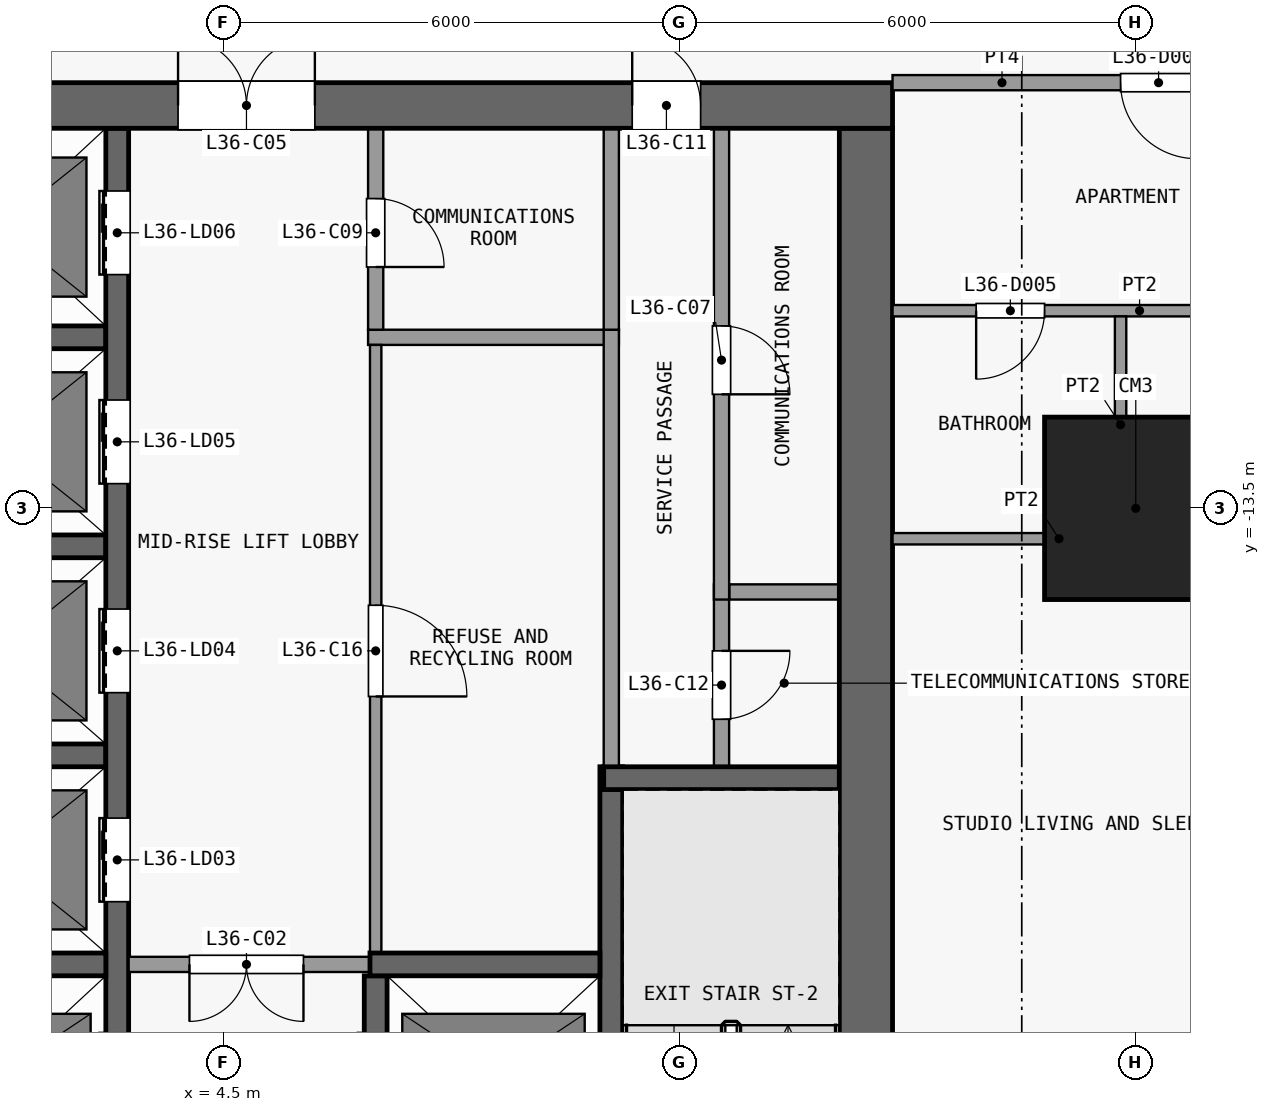
"""IFC4 building model, lengths in metres.
Left out: names, types, materials, properties, quantities, classifications, styles, units other than length and angle.
Written with IfcOpenShell. Run it as: python <this file> out.ifc"""

import sys

from ifc_helpers import new_model, si_unit, direction, frame, frame_2d, origin, origin_2d, place, context, subcontext, project, spatial, rectangle, extrude, element, fill, save


model = new_model("IFC4")
c1 = context("Model", 3, precision=1e-05, world=origin(), true_north=direction((0.0, 1.0)))
c2 = subcontext(c1, "Body", "Model", "MODEL_VIEW")
j1 = project(units=[si_unit("LENGTHUNIT", "METRE"), si_unit("PLANEANGLEUNIT", "RADIAN")], contexts=[c1])
p1 = place(None, origin())
s1 = spatial("IfcSite", under=j1, at=p1, CompositionType="ELEMENT")
p2 = place(p1, origin())
s2 = spatial("IfcBuilding", under=s1, at=p2, CompositionType="ELEMENT")
p3 = place(p2, frame((0.0, 0.0, 149.3)))
s3 = spatial("IfcBuildingStorey", under=s2, at=p3, CompositionType="ELEMENT", Elevation=149.3)
p4 = place(p3, frame((16.5, -13.5, 0.0), z_axis=(0.0, 0.0, 1.0), x_axis=(1.0, 0.0, 0.0)))
e1 = element("IfcColumn", 1, at=p4, inside=s3, PredefinedType="COLUMN", context=c2, shape_type="SweptSolid", body=[
    extrude(rectangle(XDim=2.4, YDim=2.4, at=origin_2d()), origin(), (0.0, 0.0, 1.0), 3.6),
])
p5 = place(p3, frame((-13.3, -8.2, 0.0), z_axis=(0.0, 0.0, 1.0), x_axis=(1.0, 0.0, 0.0)))
e2 = element("IfcWall", 2, at=p5, inside=s3, PredefinedType="SHEAR", context=c2, shape_type="SweptSolid", body=[
    extrude(rectangle(XDim=26.6, YDim=0.6, at=frame_2d((13.3, 0.0))), origin(), (0.0, 0.0, 1.0), 3.3),
])
p6 = place(p5, frame((7.6, 0.0, 0.0)))
e3 = element("IfcOpeningElement", 3, at=p6, cuts=e2, PredefinedType="OPENING", context=c2, shape_type="SweptSolid", body=[
    extrude(rectangle(XDim=1.8, YDim=2.1, at=frame_2d((0.9, 1.05))), frame((0.0, 0.31, 0.0), z_axis=(0.0, -1.0, 0.0), x_axis=(1.0, 0.0, 0.0)), (0.0, 0.0, 1.0), 0.62),
])
p7 = place(p5, frame((17.2, 0.0, 0.0)))
e4 = element("IfcOpeningElement", 4, at=p7, cuts=e2, PredefinedType="OPENING", context=c2, shape_type="SweptSolid", body=[
    extrude(rectangle(XDim=1.8, YDim=2.1, at=frame_2d((0.9, 1.05))), frame((0.0, 0.31, 0.0), z_axis=(0.0, -1.0, 0.0), x_axis=(1.0, 0.0, 0.0)), (0.0, 0.0, 1.0), 0.62),
])
p8 = place(p5, frame((1.525, 0.0, 0.0)))
e5 = element("IfcOpeningElement", 5, at=p8, cuts=e2, PredefinedType="OPENING", context=c2, shape_type="SweptSolid", body=[
    extrude(rectangle(XDim=1.2, YDim=2.1, at=frame_2d((0.6, 1.05))), frame((0.0, 0.31, 0.0), z_axis=(0.0, -1.0, 0.0), x_axis=(1.0, 0.0, 0.0)), (0.0, 0.0, 1.0), 0.62),
])
p9 = place(p5, frame((23.175, 0.0, 0.0)))
e6 = element("IfcOpeningElement", 6, at=p9, cuts=e2, PredefinedType="OPENING", context=c2, shape_type="SweptSolid", body=[
    extrude(rectangle(XDim=0.9, YDim=2.1, at=frame_2d((0.45, 1.05))), frame((0.0, 0.31, 0.0), z_axis=(0.0, -1.0, 0.0), x_axis=(1.0, 0.0, 0.0)), (0.0, 0.0, 1.0), 0.62),
])
p10 = place(p3, frame((12.95, -24.6, 0.0), z_axis=(0.0, 0.0, 1.0), x_axis=(0.0, 1.0, 0.0)))
e7 = element("IfcWall", 7, at=p10, inside=s3, PredefinedType="SHEAR", context=c2, shape_type="SweptSolid", body=[
    extrude(rectangle(XDim=16.1, YDim=0.7, at=frame_2d((8.05, 0.0))), origin(), (0.0, 0.0, 1.0), 3.3),
])
p11 = place(p3, frame((0.15, -19.5, 0.0), z_axis=(0.0, 0.0, 1.0), x_axis=(1.0, 0.0, 0.0)))
e8 = element("IfcWall", 8, at=p11, inside=s3, PredefinedType="SHEAR", context=c2, shape_type="SweptSolid", body=[
    extrude(rectangle(XDim=2.8, YDim=0.3, at=frame_2d((1.4, 0.0))), origin(), (0.0, 0.0, 1.0), 3.3),
])
p12 = place(p3, frame((6.575, -19.5, 0.0), z_axis=(0.0, 0.0, 1.0), x_axis=(-1.0, 0.0, 0.0)))
e9 = element("IfcWall", 9, at=p12, inside=s3, PredefinedType="PARTITIONING", context=c2, shape_type="SweptSolid", body=[
    extrude(rectangle(XDim=3.325, YDim=0.2, at=frame_2d((1.663, 0.0))), origin(), (0.0, 0.0, 1.0), 3.3),
])
p13 = place(p12, frame((1.025, 0.0, 0.0)))
e10 = element("IfcOpeningElement", 10, at=p13, cuts=e9, PredefinedType="OPENING", context=c2, shape_type="SweptSolid", body=[
    extrude(rectangle(XDim=1.5, YDim=2.1, at=frame_2d((0.75, 1.05))), frame((0.0, 0.11, 0.0), z_axis=(0.0, -1.0, 0.0), x_axis=(1.0, 0.0, 0.0)), (0.0, 0.0, 1.0), 0.22),
])
p14 = place(p3, frame((6.425, -19.5, 0.0), z_axis=(0.0, 0.0, 1.0), x_axis=(1.0, 0.0, 0.0)))
e11 = element("IfcWall", 11, at=p14, inside=s3, PredefinedType="SHEAR", context=c2, shape_type="SweptSolid", body=[
    extrude(rectangle(XDim=3.025, YDim=0.3, at=frame_2d((1.512, 0.0))), origin(), (0.0, 0.0, 1.0), 3.3),
])
p15 = place(p3, frame((9.5, -17.05, 0.0), z_axis=(0.0, 0.0, 1.0), x_axis=(1.0, 0.0, 0.0)))
e12 = element("IfcWall", 12, at=p15, inside=s3, PredefinedType="SHEAR", context=c2, shape_type="SweptSolid", body=[
    extrude(rectangle(XDim=3.1, YDim=0.3, at=frame_2d((1.55, 0.0))), origin(), (0.0, 0.0, 1.0), 3.3),
])
p16 = place(p3, frame((0.15, -16.75, 0.0), z_axis=(0.0, 0.0, 1.0), x_axis=(1.0, 0.0, 0.0)))
e13 = element("IfcWall", 13, at=p16, inside=s3, PredefinedType="SHEAR", context=c2, shape_type="SweptSolid", body=[
    extrude(rectangle(XDim=2.8, YDim=0.3, at=frame_2d((1.4, 0.0))), origin(), (0.0, 0.0, 1.0), 3.3),
])
p17 = place(p3, frame((11.15, -14.6, 0.0), z_axis=(0.0, 0.0, 1.0), x_axis=(1.0, 0.0, 0.0)))
e14 = element("IfcWall", 14, at=p17, inside=s3, PredefinedType="PARTITIONING", context=c2, shape_type="SweptSolid", body=[
    extrude(rectangle(XDim=1.45, YDim=0.2, at=frame_2d((0.725, 0.0))), origin(), (0.0, 0.0, 1.0), 3.3),
])
for number, where, z_axis, x_axis in (
    (15, (0.15, -14.0, 0.0), (0.0, 0.0, 1.0), (1.0, 0.0, 0.0)),
    (16, (0.15, -11.25, 0.0), (0.0, 0.0, 1.0), (1.0, 0.0, 0.0)),
):
    element("IfcWall", number, at=place(p3, frame(where, z_axis=z_axis, x_axis=x_axis)), inside=s3, PredefinedType="SHEAR", context=c2, shape_type="SweptSolid", body=[
        extrude(rectangle(XDim=2.8, YDim=0.3, at=frame_2d((1.4, 0.0))), origin(), (0.0, 0.0, 1.0), 3.3),
    ])
p18 = place(p3, frame((6.4, -11.25, 0.0), z_axis=(0.0, 0.0, 1.0), x_axis=(1.0, 0.0, 0.0)))
e17 = element("IfcWall", 17, at=p18, inside=s3, PredefinedType="PARTITIONING", context=c2, shape_type="SweptSolid", body=[
    extrude(rectangle(XDim=3.3, YDim=0.2, at=frame_2d((1.65, 0.0))), origin(), (0.0, 0.0, 1.0), 3.3),
])
p19 = place(p3, frame((3.1, -22.55, 0.0), z_axis=(0.0, 0.0, 1.0), x_axis=(0.0, 1.0, 0.0)))
e18 = element("IfcWall", 18, at=p19, inside=s3, PredefinedType="SHEAR", context=c2, shape_type="SweptSolid", body=[
    extrude(rectangle(XDim=14.05, YDim=0.3, at=frame_2d((7.025, 0.0))), origin(), (0.0, 0.0, 1.0), 3.3),
])
p20 = place(p19, frame((1.05, 0.0, 0.0)))
e19 = element("IfcOpeningElement", 19, at=p20, cuts=e18, PredefinedType="OPENING", context=c2, shape_type="SweptSolid", body=[
    extrude(rectangle(XDim=1.1, YDim=2.1, at=frame_2d((0.55, 1.05))), frame((0.0, 0.16, 0.0), z_axis=(0.0, -1.0, 0.0), x_axis=(1.0, 0.0, 0.0)), (0.0, 0.0, 1.0), 0.32),
])
p21 = place(p19, frame((3.875, 0.0, 0.0)))
e20 = element("IfcOpeningElement", 20, at=p21, cuts=e18, PredefinedType="OPENING", context=c2, shape_type="SweptSolid", body=[
    extrude(rectangle(XDim=1.1, YDim=2.1, at=frame_2d((0.55, 1.05))), frame((0.0, 0.16, 0.0), z_axis=(0.0, -1.0, 0.0), x_axis=(1.0, 0.0, 0.0)), (0.0, 0.0, 1.0), 0.32),
])
p22 = place(p19, frame((6.625, 0.0, 0.0)))
e21 = element("IfcOpeningElement", 21, at=p22, cuts=e18, PredefinedType="OPENING", context=c2, shape_type="SweptSolid", body=[
    extrude(rectangle(XDim=1.1, YDim=2.1, at=frame_2d((0.55, 1.05))), frame((0.0, 0.16, 0.0), z_axis=(0.0, -1.0, 0.0), x_axis=(1.0, 0.0, 0.0)), (0.0, 0.0, 1.0), 0.32),
])
p23 = place(p19, frame((9.375, 0.0, 0.0)))
e22 = element("IfcOpeningElement", 22, at=p23, cuts=e18, PredefinedType="OPENING", context=c2, shape_type="SweptSolid", body=[
    extrude(rectangle(XDim=1.1, YDim=2.1, at=frame_2d((0.55, 1.05))), frame((0.0, 0.16, 0.0), z_axis=(0.0, -1.0, 0.0), x_axis=(1.0, 0.0, 0.0)), (0.0, 0.0, 1.0), 0.32),
])
p24 = place(p19, frame((12.125, 0.0, 0.0)))
e23 = element("IfcOpeningElement", 23, at=p24, cuts=e18, PredefinedType="OPENING", context=c2, shape_type="SweptSolid", body=[
    extrude(rectangle(XDim=1.1, YDim=2.1, at=frame_2d((0.55, 1.05))), frame((0.0, 0.16, 0.0), z_axis=(0.0, -1.0, 0.0), x_axis=(1.0, 0.0, 0.0)), (0.0, 0.0, 1.0), 0.32),
])
p25 = place(p3, frame((6.5, -22.25, 0.0), z_axis=(0.0, 0.0, 1.0), x_axis=(0.0, 1.0, 0.0)))
e24 = element("IfcWall", 24, at=p25, inside=s3, PredefinedType="SHEAR", context=c2, shape_type="SweptSolid", body=[
    extrude(rectangle(XDim=2.6, YDim=0.3, at=frame_2d((1.3, 0.0))), origin(), (0.0, 0.0, 1.0), 3.3),
])
p26 = place(p25, frame((0.75, 0.0, 0.0)))
e25 = element("IfcOpeningElement", 25, at=p26, cuts=e24, PredefinedType="OPENING", context=c2, shape_type="SweptSolid", body=[
    extrude(rectangle(XDim=1.1, YDim=2.1, at=frame_2d((0.55, 1.05))), frame((0.0, 0.16, 0.0), z_axis=(0.0, -1.0, 0.0), x_axis=(1.0, 0.0, 0.0)), (0.0, 0.0, 1.0), 0.32),
])
p27 = place(p3, frame((6.5, -11.35, 0.0), z_axis=(0.0, 0.0, 1.0), x_axis=(0.0, -1.0, 0.0)))
e26 = element("IfcWall", 26, at=p27, inside=s3, PredefinedType="PARTITIONING", context=c2, shape_type="SweptSolid", body=[
    extrude(rectangle(XDim=8.0, YDim=0.15, at=frame_2d((4.0, 0.0))), origin(), (0.0, 0.0, 1.0), 3.3),
])
p28 = place(p27, frame((3.425, 0.0, 0.0)))
e27 = element("IfcOpeningElement", 27, at=p28, cuts=e26, PredefinedType="OPENING", context=c2, shape_type="SweptSolid", body=[
    extrude(rectangle(XDim=1.2, YDim=2.1, at=frame_2d((0.6, 1.05))), frame((0.0, 0.085, 0.0), z_axis=(0.0, -1.0, 0.0), x_axis=(1.0, 0.0, 0.0)), (0.0, 0.0, 1.0), 0.17),
])
p29 = place(p3, frame((6.5, -8.5, 0.0), z_axis=(0.0, 0.0, 1.0), x_axis=(0.0, -1.0, 0.0)))
e28 = element("IfcWall", 28, at=p29, inside=s3, PredefinedType="PARTITIONING", context=c2, shape_type="SweptSolid", body=[
    extrude(rectangle(XDim=2.65, YDim=0.2, at=frame_2d((1.325, 0.0))), origin(), (0.0, 0.0, 1.0), 3.3),
])
p30 = place(p29, frame((0.925, 0.0, 0.0)))
e29 = element("IfcOpeningElement", 29, at=p30, cuts=e28, PredefinedType="OPENING", context=c2, shape_type="SweptSolid", body=[
    extrude(rectangle(XDim=0.9, YDim=2.1, at=frame_2d((0.45, 1.05))), frame((0.0, 0.11, 0.0), z_axis=(0.0, -1.0, 0.0), x_axis=(1.0, 0.0, 0.0)), (0.0, 0.0, 1.0), 0.22),
])
p31 = place(p3, frame((9.6, -16.9, 0.0), z_axis=(0.0, 0.0, 1.0), x_axis=(0.0, -1.0, 0.0)))
e30 = element("IfcWall", 30, at=p31, inside=s3, PredefinedType="SHEAR", context=c2, shape_type="SweptSolid", body=[
    extrude(rectangle(XDim=7.7, YDim=0.3, at=frame_2d((3.85, 0.0))), origin(), (0.0, 0.0, 1.0), 3.3),
])
p32 = place(p31, frame((6.5, 0.0, 0.0)))
e31 = element("IfcOpeningElement", 31, at=p32, cuts=e30, PredefinedType="OPENING", context=c2, shape_type="SweptSolid", body=[
    extrude(rectangle(XDim=1.1, YDim=2.1, at=frame_2d((0.55, 1.05))), frame((0.0, 0.16, 0.0), z_axis=(0.0, -1.0, 0.0), x_axis=(1.0, 0.0, 0.0)), (0.0, 0.0, 1.0), 0.32),
])
p33 = place(p3, frame((9.6, -16.9, 0.0), z_axis=(0.0, 0.0, 1.0), x_axis=(0.0, 1.0, 0.0)))
e32 = element("IfcWall", 32, at=p33, inside=s3, PredefinedType="PARTITIONING", context=c2, shape_type="SweptSolid", body=[
    extrude(rectangle(XDim=5.75, YDim=0.2, at=frame_2d((2.875, 0.0))), origin(), (0.0, 0.0, 1.0), 3.3),
])
p34 = place(p3, frame((9.6, -11.15, 0.0), z_axis=(0.0, 0.0, 1.0), x_axis=(0.0, 1.0, 0.0)))
e33 = element("IfcWall", 33, at=p34, inside=s3, PredefinedType="PARTITIONING", context=c2, shape_type="SweptSolid", body=[
    extrude(rectangle(XDim=2.65, YDim=0.2, at=frame_2d((1.325, 0.0))), origin(), (0.0, 0.0, 1.0), 3.3),
])
p35 = place(p3, frame((11.05, -14.5, 0.0), z_axis=(0.0, 0.0, 1.0), x_axis=(0.0, -1.0, 0.0)))
e34 = element("IfcWall", 34, at=p35, inside=s3, PredefinedType="PARTITIONING", context=c2, shape_type="SweptSolid", body=[
    extrude(rectangle(XDim=2.4, YDim=0.2, at=frame_2d((1.2, 0.0))), origin(), (0.0, 0.0, 1.0), 3.3),
])
p36 = place(p35, frame((0.875, 0.0, 0.0)))
e35 = element("IfcOpeningElement", 35, at=p36, cuts=e34, PredefinedType="OPENING", context=c2, shape_type="SweptSolid", body=[
    extrude(rectangle(XDim=0.9, YDim=2.1, at=frame_2d((0.45, 1.05))), frame((0.0, 0.11, 0.0), z_axis=(0.0, -1.0, 0.0), x_axis=(1.0, 0.0, 0.0)), (0.0, 0.0, 1.0), 0.22),
])
p37 = place(p3, frame((11.05, -8.5, 0.0), z_axis=(0.0, 0.0, 1.0), x_axis=(0.0, -1.0, 0.0)))
e36 = element("IfcWall", 36, at=p37, inside=s3, PredefinedType="PARTITIONING", context=c2, shape_type="SweptSolid", body=[
    extrude(rectangle(XDim=6.2, YDim=0.2, at=frame_2d((3.1, 0.0))), origin(), (0.0, 0.0, 1.0), 3.3),
])
p38 = place(p37, frame((2.6, 0.0, 0.0)))
e37 = element("IfcOpeningElement", 37, at=p38, cuts=e36, PredefinedType="OPENING", context=c2, shape_type="SweptSolid", body=[
    extrude(rectangle(XDim=0.9, YDim=2.1, at=frame_2d((0.45, 1.05))), frame((0.0, 0.11, 0.0), z_axis=(0.0, -1.0, 0.0), x_axis=(1.0, 0.0, 0.0)), (0.0, 0.0, 1.0), 0.22),
])
p39 = place(p3, frame((13.3, -13.9, 0.0), z_axis=(0.0, 0.0, 1.0), x_axis=(1.0, 0.0, 0.0)))
e38 = element("IfcWall", 38, at=p39, inside=s3, PredefinedType="PARTITIONING", context=c2, shape_type="SweptSolid", body=[
    extrude(rectangle(XDim=6.05, YDim=0.15, at=frame_2d((3.025, 0.0))), origin(), (0.0, 0.0, 1.0), 3.3),
])
p40 = place(p39, frame((4.5, 0.0, 0.0)))
e39 = element("IfcOpeningElement", 39, at=p40, cuts=e38, PredefinedType="OPENING", context=c2, shape_type="SweptSolid", body=[
    extrude(rectangle(XDim=0.9, YDim=2.1, at=frame_2d((0.45, 1.05))), frame((0.0, 0.085, 0.0), z_axis=(0.0, -1.0, 0.0), x_axis=(1.0, 0.0, 0.0)), (0.0, 0.0, 1.0), 0.17),
])
p41 = place(p3, frame((13.3, -10.9, 0.0), z_axis=(0.0, 0.0, 1.0), x_axis=(1.0, 0.0, 0.0)))
e40 = element("IfcWall", 40, at=p41, inside=s3, PredefinedType="PARTITIONING", context=c2, shape_type="SweptSolid", body=[
    extrude(rectangle(XDim=6.863, YDim=0.15, at=frame_2d((3.431, 0.0))), origin(), (0.0, 0.0, 1.0), 3.3),
])
p42 = place(p41, frame((1.1, 0.0, 0.0)))
e41 = element("IfcOpeningElement", 41, at=p42, cuts=e40, PredefinedType="OPENING", context=c2, shape_type="SweptSolid", body=[
    extrude(rectangle(XDim=0.9, YDim=2.1, at=frame_2d((0.45, 1.05))), frame((0.0, 0.085, 0.0), z_axis=(0.0, -1.0, 0.0), x_axis=(1.0, 0.0, 0.0)), (0.0, 0.0, 1.0), 0.17),
])
p43 = place(p41, frame((4.5, 0.0, 0.0)))
e42 = element("IfcOpeningElement", 42, at=p43, cuts=e40, PredefinedType="OPENING", context=c2, shape_type="SweptSolid", body=[
    extrude(rectangle(XDim=0.9, YDim=2.1, at=frame_2d((0.45, 1.05))), frame((0.0, 0.085, 0.0), z_axis=(0.0, -1.0, 0.0), x_axis=(1.0, 0.0, 0.0)), (0.0, 0.0, 1.0), 0.17),
])
p44 = place(p3, frame((13.3, -7.9, 0.0), z_axis=(0.0, 0.0, 1.0), x_axis=(1.0, 0.0, 0.0)))
e43 = element("IfcWall", 43, at=p44, inside=s3, PredefinedType="PARTITIONING", context=c2, shape_type="SweptSolid", body=[
    extrude(rectangle(XDim=6.863, YDim=0.2, at=frame_2d((3.431, 0.0))), origin(), (0.0, 0.0, 1.0), 3.3),
])
p45 = place(p44, frame((3.0, 0.0, 0.0)))
e44 = element("IfcOpeningElement", 44, at=p45, cuts=e43, PredefinedType="OPENING", context=c2, shape_type="SweptSolid", body=[
    extrude(rectangle(XDim=1.0, YDim=2.1, at=frame_2d((0.5, 1.05))), frame((0.0, 0.11, 0.0), z_axis=(0.0, -1.0, 0.0), x_axis=(1.0, 0.0, 0.0)), (0.0, 0.0, 1.0), 0.22),
])
p46 = place(p3, frame((16.3, -13.825, 0.0), z_axis=(0.0, 0.0, 1.0), x_axis=(0.0, 1.0, 0.0)))
e45 = element("IfcWall", 45, at=p46, inside=s3, PredefinedType="PARTITIONING", context=c2, shape_type="SweptSolid", body=[
    extrude(rectangle(XDim=2.85, YDim=0.15, at=frame_2d((1.425, 0.0))), origin(), (0.0, 0.0, 1.0), 3.3),
])
p47 = place(p21, origin())
e46 = element("IfcDoor", 46, at=p47, inside=s3, OperationType="DOUBLE_DOOR_SLIDING", PredefinedType="DOOR", context=c2, shape_type="SweptSolid", body=[
    extrude(rectangle(XDim=1.1, YDim=2.1, at=frame_2d((0.55, 1.05))), frame((0.0, 0.025, 0.0), z_axis=(0.0, -1.0, 0.0), x_axis=(1.0, 0.0, 0.0)), (0.0, 0.0, 1.0), 0.05),
])
fill(e20, e46)
p48 = place(p22, origin())
e47 = element("IfcDoor", 47, at=p48, inside=s3, OperationType="DOUBLE_DOOR_SLIDING", PredefinedType="DOOR", context=c2, shape_type="SweptSolid", body=[
    extrude(rectangle(XDim=1.1, YDim=2.1, at=frame_2d((0.55, 1.05))), frame((0.0, 0.025, 0.0), z_axis=(0.0, -1.0, 0.0), x_axis=(1.0, 0.0, 0.0)), (0.0, 0.0, 1.0), 0.05),
])
fill(e21, e47)
p49 = place(p23, origin())
e48 = element("IfcDoor", 48, at=p49, inside=s3, OperationType="DOUBLE_DOOR_SLIDING", PredefinedType="DOOR", context=c2, shape_type="SweptSolid", body=[
    extrude(rectangle(XDim=1.1, YDim=2.1, at=frame_2d((0.55, 1.05))), frame((0.0, 0.025, 0.0), z_axis=(0.0, -1.0, 0.0), x_axis=(1.0, 0.0, 0.0)), (0.0, 0.0, 1.0), 0.05),
])
fill(e22, e48)
p50 = place(p24, origin())
e49 = element("IfcDoor", 49, at=p50, inside=s3, OperationType="DOUBLE_DOOR_SLIDING", PredefinedType="DOOR", context=c2, shape_type="SweptSolid", body=[
    extrude(rectangle(XDim=1.1, YDim=2.1, at=frame_2d((0.55, 1.05))), frame((0.0, 0.025, 0.0), z_axis=(0.0, -1.0, 0.0), x_axis=(1.0, 0.0, 0.0)), (0.0, 0.0, 1.0), 0.05),
])
fill(e23, e49)
p51 = place(p13, origin())
e50 = element("IfcDoor", 50, at=p51, inside=s3, OperationType="DOUBLE_DOOR_SINGLE_SWING", PredefinedType="DOOR", context=c2, shape_type="SweptSolid", body=[
    extrude(rectangle(XDim=1.5, YDim=2.1, at=frame_2d((0.75, 1.05))), frame((0.0, 0.025, 0.0), z_axis=(0.0, -1.0, 0.0), x_axis=(1.0, 0.0, 0.0)), (0.0, 0.0, 1.0), 0.05),
])
fill(e10, e50)
p52 = place(p7, origin())
e51 = element("IfcDoor", 51, at=p52, inside=s3, OperationType="DOUBLE_DOOR_SINGLE_SWING", PredefinedType="DOOR", context=c2, shape_type="SweptSolid", body=[
    extrude(rectangle(XDim=1.8, YDim=2.1, at=frame_2d((0.9, 1.05))), frame((0.0, 0.025, 0.0), z_axis=(0.0, -1.0, 0.0), x_axis=(1.0, 0.0, 0.0)), (0.0, 0.0, 1.0), 0.05),
])
fill(e4, e51)
p53 = place(p38, origin())
e52 = element("IfcDoor", 52, at=p53, inside=s3, OperationType="SINGLE_SWING_RIGHT", PredefinedType="DOOR", context=c2, shape_type="SweptSolid", body=[
    extrude(rectangle(XDim=0.9, YDim=2.1, at=frame_2d((0.45, 1.05))), frame((0.0, 0.025, 0.0), z_axis=(0.0, -1.0, 0.0), x_axis=(1.0, 0.0, 0.0)), (0.0, 0.0, 1.0), 0.05),
])
fill(e37, e52)
p54 = place(p30, origin())
e53 = element("IfcDoor", 53, at=p54, inside=s3, OperationType="SINGLE_SWING_RIGHT", PredefinedType="DOOR", context=c2, shape_type="SweptSolid", body=[
    extrude(rectangle(XDim=0.9, YDim=2.1, at=frame_2d((0.45, 1.05))), frame((0.0, 0.025, 0.0), z_axis=(0.0, -1.0, 0.0), x_axis=(1.0, 0.0, 0.0)), (0.0, 0.0, 1.0), 0.05),
])
fill(e29, e53)
p55 = place(p9, origin())
e54 = element("IfcDoor", 54, at=p55, inside=s3, OperationType="SINGLE_SWING_LEFT", PredefinedType="DOOR", context=c2, shape_type="SweptSolid", body=[
    extrude(rectangle(XDim=0.9, YDim=2.1, at=frame_2d((0.45, 1.05))), frame((0.0, 0.025, 0.0), z_axis=(0.0, -1.0, 0.0), x_axis=(1.0, 0.0, 0.0)), (0.0, 0.0, 1.0), 0.05),
])
fill(e6, e54)
p56 = place(p36, origin())
e55 = element("IfcDoor", 55, at=p56, inside=s3, OperationType="SINGLE_SWING_LEFT", PredefinedType="DOOR", context=c2, shape_type="SweptSolid", body=[
    extrude(rectangle(XDim=0.9, YDim=2.1, at=frame_2d((0.45, 1.05))), frame((0.0, 0.025, 0.0), z_axis=(0.0, -1.0, 0.0), x_axis=(1.0, 0.0, 0.0)), (0.0, 0.0, 1.0), 0.05),
])
fill(e35, e55)
p57 = place(p28, origin())
e56 = element("IfcDoor", 56, at=p57, inside=s3, OperationType="SINGLE_SWING_RIGHT", PredefinedType="DOOR", context=c2, shape_type="SweptSolid", body=[
    extrude(rectangle(XDim=1.2, YDim=2.1, at=frame_2d((0.6, 1.05))), frame((0.0, 0.025, 0.0), z_axis=(0.0, -1.0, 0.0), x_axis=(1.0, 0.0, 0.0)), (0.0, 0.0, 1.0), 0.05),
])
fill(e27, e56)
p58 = place(p42, origin())
e57 = element("IfcDoor", 57, at=p58, inside=s3, OperationType="SINGLE_SWING_LEFT", PredefinedType="DOOR", context=c2, shape_type="SweptSolid", body=[
    extrude(rectangle(XDim=0.9, YDim=2.1, at=frame_2d((0.45, 1.05))), frame((0.0, 0.025, 0.0), z_axis=(0.0, -1.0, 0.0), x_axis=(1.0, 0.0, 0.0)), (0.0, 0.0, 1.0), 0.05),
])
fill(e41, e57)
p59 = place(p45, origin())
e58 = element("IfcDoor", 58, at=p59, inside=s3, OperationType="SINGLE_SWING_RIGHT", PredefinedType="DOOR", context=c2, shape_type="SweptSolid", body=[
    extrude(rectangle(XDim=1.0, YDim=2.1, at=frame_2d((0.5, 1.05))), frame((0.0, 0.025, 0.0), z_axis=(0.0, -1.0, 0.0), x_axis=(1.0, 0.0, 0.0)), (0.0, 0.0, 1.0), 0.05),
])
fill(e44, e58)
save(model, sys.argv[1])
